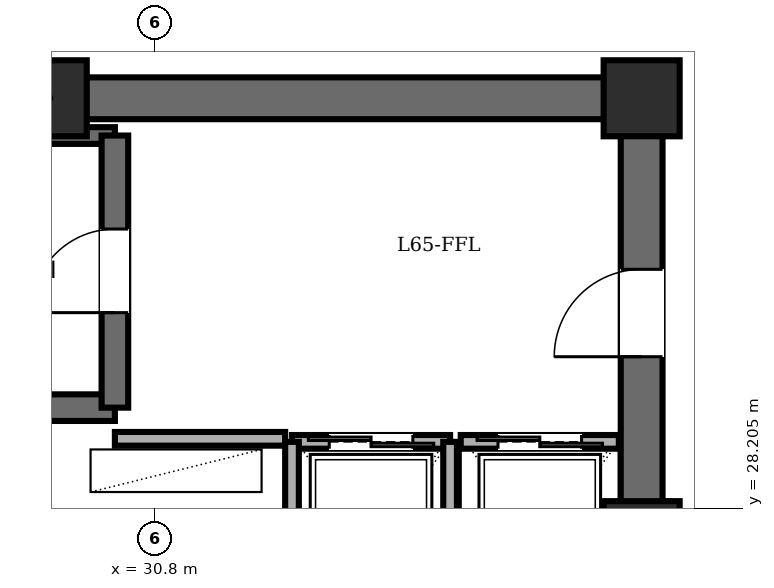
"""IFC4 building model, lengths in metres.
Left out: names, types, materials, properties, quantities, classifications, styles, units other than length and angle.
Written with IfcOpenShell. Run it as: python <this file> out.ifc"""

import sys

from ifc_helpers import new_model, si_unit, direction, frame, frame_2d, origin, origin_2d, place, context, subcontext, project, spatial, rectangle, extrude, element, fill, save


model = new_model("IFC4")
c1 = context("Model", 3, precision=1e-05, world=origin(), true_north=direction((0.0, 1.0)))
c2 = subcontext(c1, "Body", "Model", "MODEL_VIEW")
j1 = project(units=[si_unit("LENGTHUNIT", "METRE"), si_unit("PLANEANGLEUNIT", "RADIAN")], contexts=[c1])
p1 = place(None, origin())
s1 = spatial("IfcSite", under=j1, at=p1, CompositionType="ELEMENT")
p2 = place(p1, origin())
s2 = spatial("IfcBuilding", under=s1, at=p2, CompositionType="ELEMENT")
p3 = place(p2, frame((0.0, 0.0, 248.1)))
s3 = spatial("IfcBuildingStorey", under=s2, at=p3, CompositionType="ELEMENT", Elevation=248.1)
for number, where, z_axis, x_axis in (
    (1, (37.2, 27.8, 0.0), (0.0, 0.0, 1.0), (1.0, 0.0, 0.0)),
    (2, (37.2, 33.6, 0.0), (0.0, 0.0, 1.0), (1.0, 0.0, 0.0)),
    (3, (29.4, 33.6, 0.0), (0.0, 0.0, 1.0), (1.0, 0.0, 0.0)),
):
    element("IfcColumn", number, at=place(p3, frame(where, z_axis=z_axis, x_axis=x_axis)), inside=s3, PredefinedType="COLUMN", context=c2, shape_type="SweptSolid", body=[
        extrude(rectangle(XDim=1.0, YDim=1.0, at=origin_2d()), origin(), (0.0, 0.0, 1.0), 5.6),
    ])
p4 = place(p3, frame((21.6, 33.6, 0.0), z_axis=(0.0, 0.0, 1.0), x_axis=(1.0, 0.0, 0.0)))
e4 = element("IfcWall", 4, at=p4, inside=s3, PredefinedType="SHEAR", context=c2, shape_type="SweptSolid", body=[
    extrude(rectangle(XDim=15.6, YDim=0.55, at=frame_2d((7.8, 0.0))), origin(), (0.0, 0.0, 1.0), 5.36),
])
p5 = place(p3, frame((37.2, 14.4, 0.0), z_axis=(0.0, 0.0, 1.0), x_axis=(0.0, 1.0, 0.0)))
e5 = element("IfcWall", 5, at=p5, inside=s3, PredefinedType="SHEAR", context=c2, shape_type="SweptSolid", body=[
    extrude(rectangle(XDim=19.2, YDim=0.55, at=frame_2d((9.6, 0.0))), origin(), (0.0, 0.0, 1.0), 5.36),
])
p6 = place(p5, frame((15.8, 0.0, 0.0)))
e6 = element("IfcOpeningElement", 6, at=p6, cuts=e5, PredefinedType="OPENING", context=c2, shape_type="SweptSolid", body=[
    extrude(rectangle(XDim=1.15, YDim=2.15, at=frame_2d((0.575, 1.075))), frame((0.0, 0.285, 0.0), z_axis=(0.0, -1.0, 0.0), x_axis=(1.0, 0.0, 0.0)), (0.0, 0.0, 1.0), 0.57),
])
p7 = place(p5, frame((3.6, 0.0, 0.0)))
e7 = element("IfcOpeningElement", 7, at=p7, cuts=e5, PredefinedType="OPENING", context=c2, shape_type="SweptSolid", body=[
    extrude(rectangle(XDim=1.1, YDim=2.15, at=frame_2d((0.55, 1.075))), frame((0.0, 0.285, 0.0), z_axis=(0.0, -1.0, 0.0), x_axis=(1.0, 0.0, 0.0)), (0.0, 0.0, 1.0), 0.57),
])
p8 = place(p5, frame((8.6, 0.0, 0.0)))
e8 = element("IfcOpeningElement", 8, at=p8, cuts=e5, PredefinedType="OPENING", context=c2, shape_type="SweptSolid", body=[
    extrude(rectangle(XDim=1.3, YDim=2.2, at=frame_2d((0.65, 1.1))), frame((0.0, 0.285, 0.0), z_axis=(0.0, -1.0, 0.0), x_axis=(1.0, 0.0, 0.0)), (0.0, 0.0, 1.0), 0.57),
])
p9 = place(p3, frame((22.48, 29.53, 0.0), z_axis=(0.0, 0.0, 1.0), x_axis=(1.0, 0.0, 0.0)))
e9 = element("IfcWall", 9, at=p9, inside=s3, PredefinedType="SOLIDWALL", context=c2, shape_type="SweptSolid", body=[
    extrude(rectangle(XDim=7.79, YDim=0.35, at=frame_2d((3.895, 0.0))), origin(), (0.0, 0.0, 1.0), 5.36),
])
p10 = place(p3, frame((22.48, 33.11, 0.0), z_axis=(0.0, 0.0, 1.0), x_axis=(1.0, 0.0, 0.0)))
e10 = element("IfcWall", 10, at=p10, inside=s3, PredefinedType="PARTITIONING", context=c2, shape_type="SweptSolid", body=[
    extrude(rectangle(XDim=7.79, YDim=0.22, at=frame_2d((3.895, 0.0))), origin(), (0.0, 0.0, 1.0), 5.36),
])
p11 = place(p3, frame((30.27, 29.53, 0.0), z_axis=(0.0, 0.0, 1.0), x_axis=(0.0, 1.0, 0.0)))
e11 = element("IfcWall", 11, at=p11, inside=s3, PredefinedType="SOLIDWALL", context=c2, shape_type="SweptSolid", body=[
    extrude(rectangle(XDim=3.58, YDim=0.35, at=frame_2d((1.79, 0.0))), origin(), (0.0, 0.0, 1.0), 5.36),
])
p12 = place(p11, frame((1.25, 0.0, 0.0)))
e12 = element("IfcOpeningElement", 12, at=p12, cuts=e11, PredefinedType="OPENING", context=c2, shape_type="SweptSolid", body=[
    extrude(rectangle(XDim=1.1, YDim=2.15, at=frame_2d((0.55, 1.075))), frame((0.0, 0.185, 0.0), z_axis=(0.0, -1.0, 0.0), x_axis=(1.0, 0.0, 0.0)), (0.0, 0.0, 1.0), 0.37),
])
p13 = place(p3, frame((30.27, 29.12, 0.0), z_axis=(0.0, 0.0, 1.0), x_axis=(1.0, 0.0, 0.0)))
e13 = element("IfcWall", 13, at=p13, inside=s3, PredefinedType="PARTITIONING", context=c2, shape_type="SweptSolid", body=[
    extrude(rectangle(XDim=2.24, YDim=0.18, at=frame_2d((1.12, 0.0))), origin(), (0.0, 0.0, 1.0), 5.36),
])
p14 = place(p3, frame((32.6, 29.08, 0.0), z_axis=(0.0, 0.0, 1.0), x_axis=(1.0, 0.0, 0.0)))
e14 = element("IfcWall", 14, at=p14, inside=s3, PredefinedType="PARTITIONING", context=c2, shape_type="SweptSolid", body=[
    extrude(rectangle(XDim=2.08, YDim=0.18, at=frame_2d((1.04, 0.0))), origin(), (0.0, 0.0, 1.0), 5.36),
])
p15 = place(p14, frame((0.49, 0.0, 0.0)))
e15 = element("IfcOpeningElement", 15, at=p15, cuts=e14, PredefinedType="OPENING", context=c2, shape_type="SweptSolid", body=[
    extrude(rectangle(XDim=1.1, YDim=2.2, at=frame_2d((0.55, 1.1))), frame((0.0, 0.1, 0.0), z_axis=(0.0, -1.0, 0.0), x_axis=(1.0, 0.0, 0.0)), (0.0, 0.0, 1.0), 0.2),
])
for number, where, z_axis, x_axis in (
    (16, (34.68, 26.35, 0.0), (0.0, 0.0, 1.0), (0.0, 1.0, 0.0)),
    (17, (32.6, 29.08, 0.0), (0.0, 0.0, 1.0), (0.0, -1.0, 0.0)),
):
    element("IfcWall", number, at=place(p3, frame(where, z_axis=z_axis, x_axis=x_axis)), inside=s3, PredefinedType="PARTITIONING", context=c2, shape_type="SweptSolid", body=[
        extrude(rectangle(XDim=2.73, YDim=0.18, at=frame_2d((1.365, 0.0))), origin(), (0.0, 0.0, 1.0), 5.36),
    ])
p16 = place(p3, frame((34.82, 29.08, 0.0), z_axis=(0.0, 0.0, 1.0), x_axis=(1.0, 0.0, 0.0)))
e18 = element("IfcWall", 18, at=p16, inside=s3, PredefinedType="PARTITIONING", context=c2, shape_type="SweptSolid", body=[
    extrude(rectangle(XDim=2.08, YDim=0.18, at=frame_2d((1.04, 0.0))), origin(), (0.0, 0.0, 1.0), 5.36),
])
p17 = place(p16, frame((0.49, 0.0, 0.0)))
e19 = element("IfcOpeningElement", 19, at=p17, cuts=e18, PredefinedType="OPENING", context=c2, shape_type="SweptSolid", body=[
    extrude(rectangle(XDim=1.1, YDim=2.2, at=frame_2d((0.55, 1.1))), frame((0.0, 0.1, 0.0), z_axis=(0.0, -1.0, 0.0), x_axis=(1.0, 0.0, 0.0)), (0.0, 0.0, 1.0), 0.2),
])
p18 = place(p12, origin())
e20 = element("IfcDoor", 20, at=p18, inside=s3, OperationType="SINGLE_SWING_LEFT", PredefinedType="DOOR", context=c2, shape_type="SweptSolid", body=[
    extrude(rectangle(XDim=1.1, YDim=2.15, at=frame_2d((0.55, 1.075))), frame((0.0, 0.025, 0.0), z_axis=(0.0, -1.0, 0.0), x_axis=(1.0, 0.0, 0.0)), (0.0, 0.0, 1.0), 0.05),
])
fill(e12, e20)
p19 = place(p6, origin())
e21 = element("IfcDoor", 21, at=p19, inside=s3, OperationType="SINGLE_SWING_LEFT", PredefinedType="DOOR", context=c2, shape_type="SweptSolid", body=[
    extrude(rectangle(XDim=1.15, YDim=2.15, at=frame_2d((0.575, 1.075))), frame((0.0, 0.025, 0.0), z_axis=(0.0, -1.0, 0.0), x_axis=(1.0, 0.0, 0.0)), (0.0, 0.0, 1.0), 0.05),
])
fill(e6, e21)
p20 = place(p15, origin())
e22 = element("IfcDoor", 22, at=p20, inside=s3, OperationType="DOUBLE_DOOR_SLIDING", PredefinedType="DOOR", context=c2, shape_type="SweptSolid", body=[
    extrude(rectangle(XDim=1.1, YDim=2.2, at=frame_2d((0.55, 1.1))), frame((0.0, 0.025, 0.0), z_axis=(0.0, -1.0, 0.0), x_axis=(1.0, 0.0, 0.0)), (0.0, 0.0, 1.0), 0.05),
])
fill(e15, e22)
p21 = place(p17, origin())
e23 = element("IfcDoor", 23, at=p21, inside=s3, OperationType="DOUBLE_DOOR_SLIDING", PredefinedType="DOOR", context=c2, shape_type="SweptSolid", body=[
    extrude(rectangle(XDim=1.1, YDim=2.2, at=frame_2d((0.55, 1.1))), frame((0.0, 0.025, 0.0), z_axis=(0.0, -1.0, 0.0), x_axis=(1.0, 0.0, 0.0)), (0.0, 0.0, 1.0), 0.05),
])
fill(e19, e23)
save(model, sys.argv[1])
